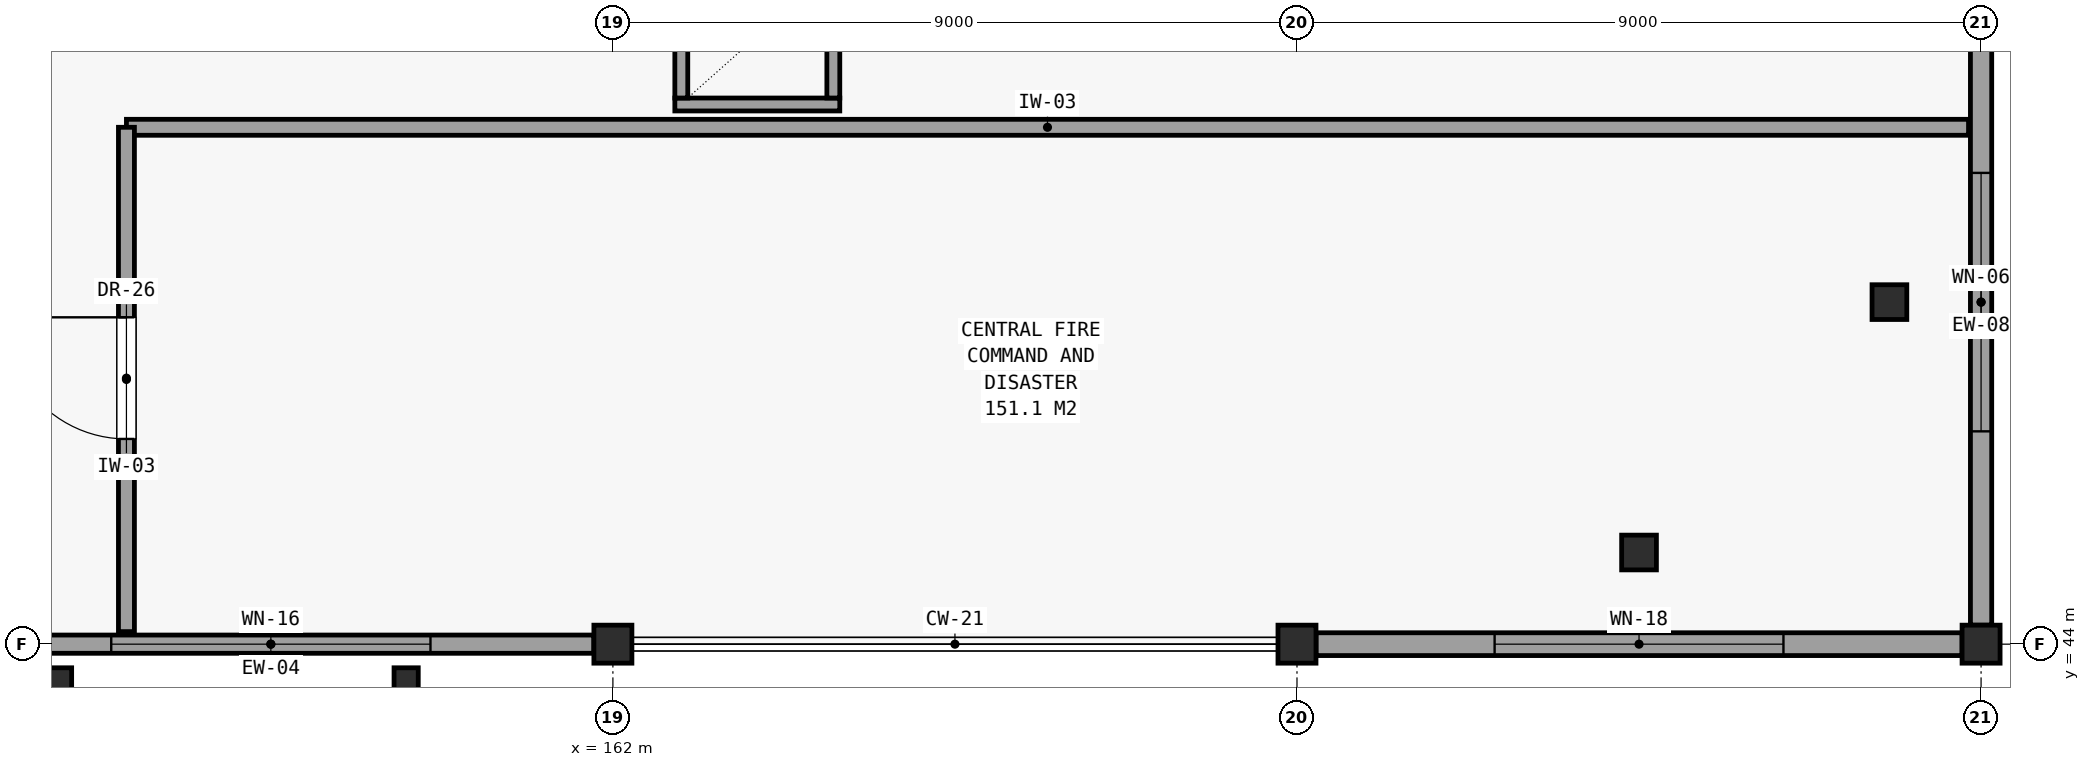
"""IFC4 building model, lengths in metres.
Left out: names, types, materials, properties, quantities, classifications, styles, units other than length and angle.
Written with IfcOpenShell. Run it as: python <this file> out.ifc"""

import sys

from ifc_helpers import new_model, si_unit, direction, frame, frame_2d, origin, origin_2d, place, context, subcontext, project, spatial, rectangle, hollow_rectangle, hollow_circle, extrude, element, fill, save


model = new_model("IFC4")
c1 = context("Model", 3, precision=1e-05, world=origin(), true_north=direction((0.0, 1.0)))
c2 = subcontext(c1, "Body", "Model", "MODEL_VIEW")
j1 = project(units=[si_unit("LENGTHUNIT", "METRE"), si_unit("PLANEANGLEUNIT", "RADIAN")], contexts=[c1])
p1 = place(None, origin())
s1 = spatial("IfcSite", under=j1, at=p1, CompositionType="ELEMENT")
p2 = place(p1, origin())
s2 = spatial("IfcBuilding", under=s1, at=p2, CompositionType="ELEMENT")
p3 = place(p2, origin())
s3 = spatial("IfcBuildingStorey", under=s2, at=p3, CompositionType="ELEMENT", Elevation=0.0)
for number, where, z_axis, x_axis in (
    (1, (154.72, 43.53, 0.0), (0.0, 0.0, 1.0), (1.0, 0.0, 0.0)),
    (2, (159.28, 43.53, 0.0), (0.0, 0.0, 1.0), (1.0, 0.0, 0.0)),
):
    element("IfcColumn", number, at=place(p3, frame(where, z_axis=z_axis, x_axis=x_axis)), inside=s3, PredefinedType="COLUMN", context=c2, shape_type="SweptSolid", body=[
        extrude(hollow_circle(Radius=0.159, WallThickness=0.01, at=origin_2d()), origin(), (0.0, 0.0, 1.0), 5.1),
    ])
for number, where, z_axis, x_axis in (
    (3, (162.0, 44.0, 0.0), (0.0, 0.0, 1.0), (1.0, 0.0, 0.0)),
    (4, (171.0, 44.0, 0.0), (0.0, 0.0, 1.0), (1.0, 0.0, 0.0)),
):
    element("IfcColumn", number, at=place(p3, frame(where, z_axis=z_axis, x_axis=x_axis)), inside=s3, PredefinedType="COLUMN", context=c2, shape_type="SweptSolid", body=[
        extrude(hollow_rectangle(XDim=0.5, YDim=0.5, WallThickness=0.025, at=origin_2d()), origin(), (0.0, 0.0, 1.0), 5.1),
    ])
for number, where, z_axis, x_axis in (
    (5, (175.5, 45.206, 0.0), (0.0, 0.0, 1.0), (1.0, 0.0, 0.0)),
    (6, (178.794, 48.5, 0.0), (0.0, 0.0, 1.0), (1.0, 0.0, 0.0)),
):
    element("IfcColumn", number, at=place(p3, frame(where, z_axis=z_axis, x_axis=x_axis)), inside=s3, PredefinedType="COLUMN", context=c2, shape_type="SweptSolid", body=[
        extrude(hollow_circle(Radius=0.229, WallThickness=0.016, at=origin_2d()), origin(), (0.0, 0.0, 1.0), 5.1),
    ])
p4 = place(p3, frame((180.0, 44.0, 0.0), z_axis=(0.0, 0.0, 1.0), x_axis=(1.0, 0.0, 0.0)))
e7 = element("IfcColumn", 7, at=p4, inside=s3, PredefinedType="COLUMN", context=c2, shape_type="SweptSolid", body=[
    extrude(hollow_rectangle(XDim=0.5, YDim=0.5, WallThickness=0.025, at=origin_2d()), origin(), (0.0, 0.0, 1.0), 5.1),
])
p5 = place(p3, frame((153.25, 44.0, 0.0), z_axis=(0.0, 0.0, 1.0), x_axis=(1.0, 0.0, 0.0)))
e8 = element("IfcWall", 8, at=p5, inside=s3, PredefinedType="SOLIDWALL", context=c2, shape_type="SweptSolid", body=[
    extrude(rectangle(XDim=8.5, YDim=0.24, at=frame_2d((4.25, 0.0))), origin(), (0.0, 0.0, 1.0), 4.252),
])
p6 = place(p5, frame((2.15, 0.0, 0.95)))
e9 = element("IfcOpeningElement", 9, at=p6, cuts=e8, PredefinedType="OPENING", context=c2, shape_type="SweptSolid", body=[
    extrude(rectangle(XDim=4.2, YDim=2.1, at=frame_2d((2.1, 1.05))), frame((0.0, 0.131, 0.0), z_axis=(0.0, -1.0, 0.0), x_axis=(1.0, 0.0, 0.0)), (0.0, 0.0, 1.0), 0.262),
])
p7 = place(p3, frame((171.25, 44.0, 0.0), z_axis=(0.0, 0.0, 1.0), x_axis=(1.0, 0.0, 0.0)))
e10 = element("IfcWall", 10, at=p7, inside=s3, PredefinedType="SOLIDWALL", context=c2, shape_type="SweptSolid", body=[
    extrude(rectangle(XDim=8.5, YDim=0.3, at=frame_2d((4.25, 0.0))), origin(), (0.0, 0.0, 1.0), 4.252),
])
p8 = place(p7, frame((2.35, 0.0, 0.95)))
e11 = element("IfcOpeningElement", 11, at=p8, cuts=e10, PredefinedType="OPENING", context=c2, shape_type="SweptSolid", body=[
    extrude(rectangle(XDim=3.8, YDim=2.1, at=frame_2d((1.9, 1.05))), frame((0.0, 0.161, 0.0), z_axis=(0.0, -1.0, 0.0), x_axis=(1.0, 0.0, 0.0)), (0.0, 0.0, 1.0), 0.322),
])
p9 = place(p3, frame((180.0, 44.25, 0.0), z_axis=(0.0, 0.0, 1.0), x_axis=(0.0, 1.0, 0.0)))
e12 = element("IfcWall", 12, at=p9, inside=s3, PredefinedType="SOLIDWALL", context=c2, shape_type="SweptSolid", body=[
    extrude(rectangle(XDim=8.5, YDim=0.28, at=frame_2d((4.25, 0.0))), origin(), (0.0, 0.0, 1.0), 4.44),
])
p10 = place(p9, frame((2.55, 0.0, 0.95)))
e13 = element("IfcOpeningElement", 13, at=p10, cuts=e12, PredefinedType="OPENING", context=c2, shape_type="SweptSolid", body=[
    extrude(rectangle(XDim=3.4, YDim=2.0, at=frame_2d((1.7, 1.0))), frame((0.0, 0.151, 0.0), z_axis=(0.0, -1.0, 0.0), x_axis=(1.0, 0.0, 0.0)), (0.0, 0.0, 1.0), 0.302),
])
p11 = place(p3, frame((162.815, 51.1, 0.0), z_axis=(0.0, 0.0, 1.0), x_axis=(1.0, 0.0, 0.0)))
e14 = element("IfcWall", 14, at=p11, inside=s3, PredefinedType="PARTITIONING", context=c2, shape_type="SweptSolid", body=[
    extrude(rectangle(XDim=2.17, YDim=0.17, at=frame_2d((1.085, 0.0))), origin(), (0.0, 0.0, 1.0), 4.82),
])
for number, where, z_axis, x_axis in (
    (15, (162.9, 51.185, 0.0), (0.0, 0.0, 1.0), (0.0, 1.0, 0.0)),
    (16, (164.9, 51.185, 0.0), (0.0, 0.0, 1.0), (0.0, 1.0, 0.0)),
):
    element("IfcWall", number, at=place(p3, frame(where, z_axis=z_axis, x_axis=x_axis)), inside=s3, PredefinedType="PARTITIONING", context=c2, shape_type="SweptSolid", body=[
        extrude(rectangle(XDim=1.63, YDim=0.17, at=frame_2d((0.815, 0.0))), origin(), (0.0, 0.0, 1.0), 4.252),
    ])
p12 = place(p3, frame((155.6, 50.8, 0.0), z_axis=(0.0, 0.0, 1.0), x_axis=(1.0, 0.0, 0.0)))
e17 = element("IfcWall", 17, at=p12, inside=s3, PredefinedType="PARTITIONING", context=c2, shape_type="SweptSolid", body=[
    extrude(rectangle(XDim=24.235, YDim=0.21, at=frame_2d((12.117, 0.0))), origin(), (0.0, 0.0, 1.0), 4.19),
])
p13 = place(p3, frame((155.6, 44.165, 0.0), z_axis=(0.0, 0.0, 1.0), x_axis=(0.0, 1.0, 0.0)))
e18 = element("IfcWall", 18, at=p13, inside=s3, PredefinedType="PARTITIONING", context=c2, shape_type="SweptSolid", body=[
    extrude(rectangle(XDim=6.635, YDim=0.21, at=frame_2d((3.317, 0.0))), origin(), (0.0, 0.0, 1.0), 4.252),
])
p14 = place(p13, frame((2.535, 0.0, 0.0)))
e19 = element("IfcOpeningElement", 19, at=p14, cuts=e18, PredefinedType="OPENING", context=c2, shape_type="SweptSolid", body=[
    extrude(rectangle(XDim=1.6, YDim=2.3, at=frame_2d((0.8, 1.15))), frame((0.0, 0.116, 0.0), z_axis=(0.0, -1.0, 0.0), x_axis=(1.0, 0.0, 0.0)), (0.0, 0.0, 1.0), 0.232),
])
p15 = place(p6, origin())
e20 = element("IfcWindow", 20, at=p15, inside=s3, PartitioningType="SINGLE_PANEL", PredefinedType="WINDOW", context=c2, shape_type="SweptSolid", body=[
    extrude(rectangle(XDim=4.2, YDim=2.1, at=frame_2d((2.1, 1.05))), frame((0.0, 0.03, 0.0), z_axis=(0.0, -1.0, 0.0), x_axis=(1.0, 0.0, 0.0)), (0.0, 0.0, 1.0), 0.06),
])
fill(e9, e20)
p16 = place(p8, origin())
e21 = element("IfcWindow", 21, at=p16, inside=s3, PartitioningType="SINGLE_PANEL", PredefinedType="WINDOW", context=c2, shape_type="SweptSolid", body=[
    extrude(rectangle(XDim=3.8, YDim=2.1, at=frame_2d((1.9, 1.05))), frame((0.0, 0.03, 0.0), z_axis=(0.0, -1.0, 0.0), x_axis=(1.0, 0.0, 0.0)), (0.0, 0.0, 1.0), 0.06),
])
fill(e11, e21)
p17 = place(p10, origin())
e22 = element("IfcWindow", 22, at=p17, inside=s3, PartitioningType="SINGLE_PANEL", PredefinedType="WINDOW", context=c2, shape_type="SweptSolid", body=[
    extrude(rectangle(XDim=3.4, YDim=2.0, at=frame_2d((1.7, 1.0))), frame((0.0, 0.03, 0.0), z_axis=(0.0, -1.0, 0.0), x_axis=(1.0, 0.0, 0.0)), (0.0, 0.0, 1.0), 0.06),
])
fill(e13, e22)
p18 = place(p14, origin())
e23 = element("IfcDoor", 23, at=p18, inside=s3, OperationType="SINGLE_SWING_RIGHT", PredefinedType="DOOR", context=c2, shape_type="SweptSolid", body=[
    extrude(rectangle(XDim=1.6, YDim=2.3, at=frame_2d((0.8, 1.15))), frame((0.0, 0.025, 0.0), z_axis=(0.0, -1.0, 0.0), x_axis=(1.0, 0.0, 0.0)), (0.0, 0.0, 1.0), 0.05),
])
fill(e19, e23)
save(model, sys.argv[1])
